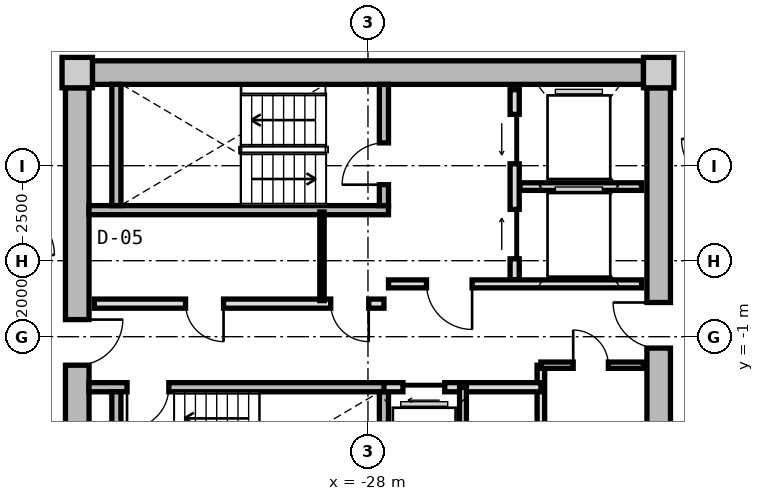
"""IFC4 building model, lengths in metres.
Left out: names, types, materials, properties, quantities, classifications, styles, units other than length and angle.
Written with IfcOpenShell. Run it as: python <this file> out.ifc"""

import sys

from ifc_helpers import new_model, si_unit, direction, frame, frame_2d, origin, origin_2d, place, context, subcontext, project, spatial, rectangle, extrude, source, transform, mapped, element, fill, save


model = new_model("IFC4")
c1 = context("Model", 3, precision=1e-05, world=origin(), true_north=direction((0.0, 1.0)))
c2 = subcontext(c1, "Body", "Model", "MODEL_VIEW")
j1 = project(units=[si_unit("LENGTHUNIT", "METRE"), si_unit("PLANEANGLEUNIT", "RADIAN")], contexts=[c1])
p1 = place(None, origin())
s1 = spatial("IfcSite", under=j1, at=p1, CompositionType="ELEMENT")
p2 = place(p1, origin())
s2 = spatial("IfcBuilding", under=s1, at=p2, CompositionType="ELEMENT")
p3 = place(p2, frame((0.0, 0.0, 140.4)))
s3 = spatial("IfcBuildingStorey", under=s2, at=p3, CompositionType="ELEMENT", Elevation=140.4)
m1 = source(origin(), c2, "Body", "SweptSolid", [
    extrude(rectangle(XDim=0.8, YDim=0.8, at=origin_2d()), origin(), (0.0, 0.0, 1.0), 3.05),
])
for number, where, z_axis, x_axis in (
    (1, (-20.35, 5.95, 0.0), (0.0, 0.0, 1.0), (1.0, 0.0, 0.0)),
    (2, (-35.65, 5.95, 0.0), (0.0, 0.0, 1.0), (1.0, 0.0, 0.0)),
):
    element("IfcColumn", number, at=place(p3, frame(where, z_axis=z_axis, x_axis=x_axis)), inside=s3, PredefinedType="COLUMN", context=c2, shape_type="MappedRepresentation", body=[
        mapped(m1, transform((0.0, 0.0, 0.0), x_axis=(1.0, 0.0, 0.0), y_axis=(0.0, 1.0, 0.0), z_axis=(0.0, 0.0, 1.0), scale=1.0)),
    ])
m2 = source(origin(), c2, "Body", "SweptSolid", [
    extrude(rectangle(XDim=14.5, YDim=0.62, at=frame_2d((7.25, 0.0))), origin(), (0.0, 0.0, 1.0), 2.81),
])
p4 = place(p3, frame((-35.25, 5.95, 0.0), z_axis=(0.0, 0.0, 1.0), x_axis=(1.0, 0.0, 0.0)))
e3 = element("IfcWall", 3, at=p4, inside=s3, PredefinedType="SHEAR", context=c2, shape_type="MappedRepresentation", body=[
    mapped(m2, transform((0.0, 0.0, 0.0), x_axis=(1.0, 0.0, 0.0), y_axis=(0.0, 1.0, 0.0), z_axis=(0.0, 0.0, 1.0), scale=1.0)),
])
m3 = source(origin(), c2, "Body", "SweptSolid", [
    extrude(rectangle(XDim=11.1, YDim=0.62, at=frame_2d((5.55, 0.0))), origin(), (0.0, 0.0, 1.0), 2.81),
])
p5 = place(p3, frame((-35.65, -5.55, 0.0), z_axis=(0.0, 0.0, 1.0), x_axis=(0.0, 1.0, 0.0)))
e4 = element("IfcWall", 4, at=p5, inside=s3, PredefinedType="SHEAR", context=c2, shape_type="MappedRepresentation", body=[
    mapped(m3, transform((0.0, 0.0, 0.0), x_axis=(1.0, 0.0, 0.0), y_axis=(0.0, 1.0, 0.0), z_axis=(0.0, 0.0, 1.0), scale=1.0)),
])
p6 = place(p5, frame((3.8, 0.0, 0.0)))
e5 = element("IfcOpeningElement", 5, at=p6, cuts=e4, PredefinedType="OPENING", context=c2, shape_type="SweptSolid", body=[
    extrude(rectangle(XDim=1.2, YDim=2.15, at=frame_2d((0.6, 1.075))), frame((0.0, 0.32, 0.0), z_axis=(0.0, -1.0, 0.0), x_axis=(1.0, 0.0, 0.0)), (0.0, 0.0, 1.0), 0.64),
])
p7 = place(p3, frame((-20.35, 5.55, 0.0), z_axis=(0.0, 0.0, 1.0), x_axis=(0.0, -1.0, 0.0)))
e6 = element("IfcWall", 6, at=p7, inside=s3, PredefinedType="SHEAR", context=c2, shape_type="MappedRepresentation", body=[
    mapped(m3, transform((0.0, 0.0, 0.0), x_axis=(1.0, 0.0, 0.0), y_axis=(0.0, 1.0, 0.0), z_axis=(0.0, 0.0, 1.0), scale=1.0)),
])
p8 = place(p7, frame((5.65, 0.0, 0.0)))
e7 = element("IfcOpeningElement", 7, at=p8, cuts=e6, PredefinedType="OPENING", context=c2, shape_type="SweptSolid", body=[
    extrude(rectangle(XDim=1.2, YDim=2.15, at=frame_2d((0.6, 1.075))), frame((0.0, 0.32, 0.0), z_axis=(0.0, -1.0, 0.0), x_axis=(1.0, 0.0, 0.0)), (0.0, 0.0, 1.0), 0.64),
])
m4 = source(origin(), c2, "Body", "SweptSolid", [
    extrude(rectangle(XDim=7.88, YDim=0.24, at=frame_2d((3.94, 0.0))), origin(), (0.0, 0.0, 1.0), 2.81),
])
p9 = place(p3, frame((-35.34, 2.33, 0.0), z_axis=(0.0, 0.0, 1.0), x_axis=(1.0, 0.0, 0.0)))
e8 = element("IfcWall", 8, at=p9, inside=s3, PredefinedType="PARTITIONING", context=c2, shape_type="MappedRepresentation", body=[
    mapped(m4, transform((0.0, 0.0, 0.0), x_axis=(1.0, 0.0, 0.0), y_axis=(0.0, 1.0, 0.0), z_axis=(0.0, 0.0, 1.0), scale=1.0)),
])
m5 = source(origin(), c2, "Body", "SweptSolid", [
    extrude(rectangle(XDim=3.19, YDim=0.24, at=frame_2d((1.595, 0.0))), origin(), (0.0, 0.0, 1.0), 2.81),
])
p10 = place(p3, frame((-34.62, 2.45, 0.0), z_axis=(0.0, 0.0, 1.0), x_axis=(0.0, 1.0, 0.0)))
e9 = element("IfcWall", 9, at=p10, inside=s3, PredefinedType="PARTITIONING", context=c2, shape_type="MappedRepresentation", body=[
    mapped(m5, transform((0.0, 0.0, 0.0), x_axis=(1.0, 0.0, 0.0), y_axis=(0.0, 1.0, 0.0), z_axis=(0.0, 0.0, 1.0), scale=1.0)),
])
p11 = place(p3, frame((-27.58, 2.45, 0.0), z_axis=(0.0, 0.0, 1.0), x_axis=(0.0, 1.0, 0.0)))
e10 = element("IfcWall", 10, at=p11, inside=s3, PredefinedType="PARTITIONING", context=c2, shape_type="MappedRepresentation", body=[
    mapped(m5, transform((0.0, 0.0, 0.0), x_axis=(1.0, 0.0, 0.0), y_axis=(0.0, 1.0, 0.0), z_axis=(0.0, 0.0, 1.0), scale=1.0)),
])
p12 = place(p11, frame((0.55, 0.0, 0.0)))
e11 = element("IfcOpeningElement", 11, at=p12, cuts=e10, PredefinedType="OPENING", context=c2, shape_type="SweptSolid", body=[
    extrude(rectangle(XDim=1.1, YDim=2.15, at=frame_2d((0.55, 1.075))), frame((0.0, 0.13, 0.0), z_axis=(0.0, -1.0, 0.0), x_axis=(1.0, 0.0, 0.0)), (0.0, 0.0, 1.0), 0.26),
])
p13 = place(p3, frame((-35.34, -2.33, 0.0), z_axis=(0.0, 0.0, 1.0), x_axis=(1.0, 0.0, 0.0)))
e12 = element("IfcWall", 12, at=p13, inside=s3, PredefinedType="PARTITIONING", context=c2, shape_type="MappedRepresentation", body=[
    mapped(m4, transform((0.0, 0.0, 0.0), x_axis=(1.0, 0.0, 0.0), y_axis=(0.0, 1.0, 0.0), z_axis=(0.0, 0.0, 1.0), scale=1.0)),
])
p14 = place(p13, frame((1.0, 0.0, 0.0)))
e13 = element("IfcOpeningElement", 13, at=p14, cuts=e12, PredefinedType="OPENING", context=c2, shape_type="SweptSolid", body=[
    extrude(rectangle(XDim=1.1, YDim=2.15, at=frame_2d((0.55, 1.075))), frame((0.0, 0.13, 0.0), z_axis=(0.0, -1.0, 0.0), x_axis=(1.0, 0.0, 0.0)), (0.0, 0.0, 1.0), 0.26),
])
for number, where, z_axis, x_axis in (
    (14, (-34.62, -5.64, 0.0), (0.0, 0.0, 1.0), (0.0, 1.0, 0.0)),
    (15, (-27.58, -5.64, 0.0), (0.0, 0.0, 1.0), (0.0, 1.0, 0.0)),
):
    element("IfcWall", number, at=place(p3, frame(where, z_axis=z_axis, x_axis=x_axis)), inside=s3, PredefinedType="PARTITIONING", context=c2, shape_type="MappedRepresentation", body=[
        mapped(m5, transform((0.0, 0.0, 0.0), x_axis=(1.0, 0.0, 0.0), y_axis=(0.0, 1.0, 0.0), z_axis=(0.0, 0.0, 1.0), scale=1.0)),
    ])
m6 = source(origin(), c2, "Body", "SweptSolid", [
    extrude(rectangle(XDim=5.0, YDim=0.24, at=frame_2d((2.5, 0.0))), origin(), (0.0, 0.0, 1.0), 2.795),
])
p15 = place(p3, frame((-24.14, 0.5, 0.0), z_axis=(0.0, 0.0, 1.0), x_axis=(0.0, 1.0, 0.0)))
e16 = element("IfcWall", 16, at=p15, inside=s3, PredefinedType="PARTITIONING", context=c2, shape_type="MappedRepresentation", body=[
    mapped(m6, transform((0.0, 0.0, 0.0), x_axis=(1.0, 0.0, 0.0), y_axis=(0.0, 1.0, 0.0), z_axis=(0.0, 0.0, 1.0), scale=1.0)),
])
p16 = place(p15, frame((3.05, 0.0, 0.0)))
e17 = element("IfcOpeningElement", 17, at=p16, cuts=e16, PredefinedType="OPENING", context=c2, shape_type="SweptSolid", body=[
    extrude(rectangle(XDim=1.3, YDim=2.2, at=frame_2d((0.65, 1.1))), frame((0.0, 0.13, 0.0), z_axis=(0.0, -1.0, 0.0), x_axis=(1.0, 0.0, 0.0)), (0.0, 0.0, 1.0), 0.26),
])
p17 = place(p15, frame((0.55, 0.0, 0.0)))
e18 = element("IfcOpeningElement", 18, at=p17, cuts=e16, PredefinedType="OPENING", context=c2, shape_type="SweptSolid", body=[
    extrude(rectangle(XDim=1.3, YDim=2.2, at=frame_2d((0.65, 1.1))), frame((0.0, 0.13, 0.0), z_axis=(0.0, -1.0, 0.0), x_axis=(1.0, 0.0, 0.0)), (0.0, 0.0, 1.0), 0.26),
])
m7 = source(origin(), c2, "Body", "SweptSolid", [
    extrude(rectangle(XDim=3.2, YDim=0.2, at=frame_2d((1.6, 0.0))), origin(), (0.0, 0.0, 1.0), 2.795),
])
p18 = place(p3, frame((-24.0, 2.95, 0.0), z_axis=(0.0, 0.0, 1.0), x_axis=(1.0, 0.0, 0.0)))
e19 = element("IfcWall", 19, at=p18, inside=s3, PredefinedType="PARTITIONING", context=c2, shape_type="MappedRepresentation", body=[
    mapped(m7, transform((0.0, 0.0, 0.0), x_axis=(1.0, 0.0, 0.0), y_axis=(0.0, 1.0, 0.0), z_axis=(0.0, 0.0, 1.0), scale=1.0)),
])
m8 = source(origin(), c2, "Body", "SweptSolid", [
    extrude(rectangle(XDim=6.66, YDim=0.21, at=frame_2d((3.33, 0.0))), origin(), (0.0, 0.0, 1.0), 2.795),
])
p19 = place(p3, frame((-27.46, 0.39, 0.0), z_axis=(0.0, 0.0, 1.0), x_axis=(1.0, 0.0, 0.0)))
e20 = element("IfcWall", 20, at=p19, inside=s3, PredefinedType="PARTITIONING", context=c2, shape_type="MappedRepresentation", body=[
    mapped(m8, transform((0.0, 0.0, 0.0), x_axis=(1.0, 0.0, 0.0), y_axis=(0.0, 1.0, 0.0), z_axis=(0.0, 0.0, 1.0), scale=1.0)),
])
p20 = place(p19, frame((1.0, 0.0, 0.0)))
e21 = element("IfcOpeningElement", 21, at=p20, cuts=e20, PredefinedType="OPENING", context=c2, shape_type="SweptSolid", body=[
    extrude(rectangle(XDim=1.2, YDim=2.15, at=frame_2d((0.6, 1.075))), frame((0.0, 0.115, 0.0), z_axis=(0.0, -1.0, 0.0), x_axis=(1.0, 0.0, 0.0)), (0.0, 0.0, 1.0), 0.23),
])
m9 = source(origin(), c2, "Body", "SweptSolid", [
    extrude(rectangle(XDim=7.62, YDim=0.24, at=frame_2d((3.81, 0.0))), origin(), (0.0, 0.0, 1.0), 2.795),
])
p21 = place(p3, frame((-35.2, -0.13, 0.0), z_axis=(0.0, 0.0, 1.0), x_axis=(1.0, 0.0, 0.0)))
e22 = element("IfcWall", 22, at=p21, inside=s3, PredefinedType="PARTITIONING", context=c2, shape_type="MappedRepresentation", body=[
    mapped(m9, transform((0.0, 0.0, 0.0), x_axis=(1.0, 0.0, 0.0), y_axis=(0.0, 1.0, 0.0), z_axis=(0.0, 0.0, 1.0), scale=1.0)),
])
p22 = place(p21, frame((6.22, 0.0, 0.0)))
e23 = element("IfcOpeningElement", 23, at=p22, cuts=e22, PredefinedType="OPENING", context=c2, shape_type="SweptSolid", body=[
    extrude(rectangle(XDim=1.0, YDim=2.1, at=frame_2d((0.5, 1.05))), frame((0.0, 0.13, 0.0), z_axis=(0.0, -1.0, 0.0), x_axis=(1.0, 0.0, 0.0)), (0.0, 0.0, 1.0), 0.26),
])
p23 = place(p21, frame((2.4, 0.0, 0.0)))
e24 = element("IfcOpeningElement", 24, at=p23, cuts=e22, PredefinedType="OPENING", context=c2, shape_type="SweptSolid", body=[
    extrude(rectangle(XDim=1.0, YDim=2.1, at=frame_2d((0.5, 1.05))), frame((0.0, 0.13, 0.0), z_axis=(0.0, -1.0, 0.0), x_axis=(1.0, 0.0, 0.0)), (0.0, 0.0, 1.0), 0.26),
])
m10 = source(origin(), c2, "Body", "SweptSolid", [
    extrude(rectangle(XDim=2.33, YDim=0.115, at=frame_2d((1.165, 0.0))), origin(), (0.0, 0.0, 1.0), 2.795),
])
p24 = place(p3, frame((-29.21, -0.05, 0.0), z_axis=(0.0, 0.0, 1.0), x_axis=(0.0, 1.0, 0.0)))
e25 = element("IfcWall", 25, at=p24, inside=s3, PredefinedType="PARTITIONING", context=c2, shape_type="MappedRepresentation", body=[
    mapped(m10, transform((0.0, 0.0, 0.0), x_axis=(1.0, 0.0, 0.0), y_axis=(0.0, 1.0, 0.0), z_axis=(0.0, 0.0, 1.0), scale=1.0)),
])
m11 = source(origin(), c2, "Body", "SweptSolid", [
    extrude(rectangle(XDim=3.8, YDim=0.2, at=frame_2d((1.9, 0.0))), origin(), (0.0, 0.0, 1.0), 2.795),
])
p25 = place(p3, frame((-23.45, -5.55, 0.0), z_axis=(0.0, 0.0, 1.0), x_axis=(0.0, 1.0, 0.0)))
e26 = element("IfcWall", 26, at=p25, inside=s3, PredefinedType="PARTITIONING", context=c2, shape_type="MappedRepresentation", body=[
    mapped(m11, transform((0.0, 0.0, 0.0), x_axis=(1.0, 0.0, 0.0), y_axis=(0.0, 1.0, 0.0), z_axis=(0.0, 0.0, 1.0), scale=1.0)),
])
m12 = source(origin(), c2, "Body", "SweptSolid", [
    extrude(rectangle(XDim=4.13, YDim=0.24, at=frame_2d((2.065, 0.0))), origin(), (0.0, 0.0, 1.0), 2.795),
])
p26 = place(p3, frame((-27.58, -2.33, 0.0), z_axis=(0.0, 0.0, 1.0), x_axis=(1.0, 0.0, 0.0)))
e27 = element("IfcWall", 27, at=p26, inside=s3, PredefinedType="PARTITIONING", context=c2, shape_type="MappedRepresentation", body=[
    mapped(m12, transform((0.0, 0.0, 0.0), x_axis=(1.0, 0.0, 0.0), y_axis=(0.0, 1.0, 0.0), z_axis=(0.0, 0.0, 1.0), scale=1.0)),
])
p27 = place(p26, frame((0.5, 0.0, 0.0)))
e28 = element("IfcOpeningElement", 28, at=p27, cuts=e27, PredefinedType="OPENING", context=c2, shape_type="SweptSolid", body=[
    extrude(rectangle(XDim=1.1, YDim=2.2, at=frame_2d((0.55, 1.1))), frame((0.0, 0.13, 0.0), z_axis=(0.0, -1.0, 0.0), x_axis=(1.0, 0.0, 0.0)), (0.0, 0.0, 1.0), 0.26),
])
m13 = source(origin(), c2, "Body", "SweptSolid", [
    extrude(rectangle(XDim=3.22, YDim=0.18, at=frame_2d((1.61, 0.0))), origin(), (0.0, 0.0, 1.0), 2.795),
])
p28 = place(p3, frame((-25.5, -5.55, 0.0), z_axis=(0.0, 0.0, 1.0), x_axis=(0.0, 1.0, 0.0)))
e29 = element("IfcWall", 29, at=p28, inside=s3, PredefinedType="PARTITIONING", context=c2, shape_type="MappedRepresentation", body=[
    mapped(m13, transform((0.0, 0.0, 0.0), x_axis=(1.0, 0.0, 0.0), y_axis=(0.0, 1.0, 0.0), z_axis=(0.0, 0.0, 1.0), scale=1.0)),
])
m14 = source(origin(), c2, "Body", "SweptSolid", [
    extrude(rectangle(XDim=2.7, YDim=0.165, at=frame_2d((1.35, 0.0))), origin(), (0.0, 0.0, 1.0), 2.795),
])
p29 = place(p3, frame((-23.45, -1.75, 0.0), z_axis=(0.0, 0.0, 1.0), x_axis=(1.0, 0.0, 0.0)))
e30 = element("IfcWall", 30, at=p29, inside=s3, PredefinedType="PARTITIONING", context=c2, shape_type="MappedRepresentation", body=[
    mapped(m14, transform((0.0, 0.0, 0.0), x_axis=(1.0, 0.0, 0.0), y_axis=(0.0, 1.0, 0.0), z_axis=(0.0, 0.0, 1.0), scale=1.0)),
])
p30 = place(p29, frame((0.85, 0.0, 0.0)))
e31 = element("IfcOpeningElement", 31, at=p30, cuts=e30, PredefinedType="OPENING", context=c2, shape_type="SweptSolid", body=[
    extrude(rectangle(XDim=0.925, YDim=2.1, at=frame_2d((0.462, 1.05))), frame((0.0, 0.093, 0.0), z_axis=(0.0, -1.0, 0.0), x_axis=(1.0, 0.0, 0.0)), (0.0, 0.0, 1.0), 0.185),
])
m15 = source(origin(), c2, "Body", "SweptSolid", [
    extrude(rectangle(XDim=1.1, YDim=2.15, at=frame_2d((0.55, 1.075))), frame((0.0, 0.025, 0.0), z_axis=(0.0, -1.0, 0.0), x_axis=(1.0, 0.0, 0.0)), (0.0, 0.0, 1.0), 0.05),
])
p31 = place(p12, origin())
e32 = element("IfcDoor", 32, at=p31, inside=s3, OperationType="SINGLE_SWING_LEFT", PredefinedType="DOOR", context=c2, shape_type="MappedRepresentation", body=[
    mapped(m15, transform((0.0, 0.0, 0.0), x_axis=(1.0, 0.0, 0.0), y_axis=(0.0, 1.0, 0.0), z_axis=(0.0, 0.0, 1.0), scale=1.0)),
])
fill(e11, e32)
p32 = place(p14, frame((1.1, 0.0, 0.0), z_axis=(0.0, 0.0, 1.0), x_axis=(-1.0, 0.0, 0.0)))
e33 = element("IfcDoor", 33, at=p32, inside=s3, OperationType="SINGLE_SWING_RIGHT", PredefinedType="DOOR", context=c2, shape_type="MappedRepresentation", body=[
    mapped(m15, transform((0.0, 0.0, 0.0), x_axis=(1.0, 0.0, 0.0), y_axis=(0.0, 1.0, 0.0), z_axis=(0.0, 0.0, 1.0), scale=1.0)),
])
fill(e13, e33)
m16 = source(origin(), c2, "Body", "SweptSolid", [
    extrude(rectangle(XDim=1.3, YDim=2.2, at=frame_2d((0.65, 1.1))), frame((0.0, 0.025, 0.0), z_axis=(0.0, -1.0, 0.0), x_axis=(1.0, 0.0, 0.0)), (0.0, 0.0, 1.0), 0.05),
])
p33 = place(p16, origin())
e34 = element("IfcDoor", 34, at=p33, inside=s3, OperationType="SLIDING_TO_LEFT", PredefinedType="DOOR", context=c2, shape_type="MappedRepresentation", body=[
    mapped(m16, transform((0.0, 0.0, 0.0), x_axis=(1.0, 0.0, 0.0), y_axis=(0.0, 1.0, 0.0), z_axis=(0.0, 0.0, 1.0), scale=1.0)),
])
fill(e17, e34)
p34 = place(p17, origin())
e35 = element("IfcDoor", 35, at=p34, inside=s3, OperationType="SLIDING_TO_RIGHT", PredefinedType="DOOR", context=c2, shape_type="MappedRepresentation", body=[
    mapped(m16, transform((0.0, 0.0, 0.0), x_axis=(1.0, 0.0, 0.0), y_axis=(0.0, 1.0, 0.0), z_axis=(0.0, 0.0, 1.0), scale=1.0)),
])
fill(e18, e35)
m17 = source(origin(), c2, "Body", "SweptSolid", [
    extrude(rectangle(XDim=1.2, YDim=2.15, at=frame_2d((0.6, 1.075))), frame((0.0, 0.025, 0.0), z_axis=(0.0, -1.0, 0.0), x_axis=(1.0, 0.0, 0.0)), (0.0, 0.0, 1.0), 0.05),
])
p35 = place(p20, frame((1.2, 0.0, 0.0), z_axis=(0.0, 0.0, 1.0), x_axis=(-1.0, 0.0, 0.0)))
e36 = element("IfcDoor", 36, at=p35, inside=s3, OperationType="SINGLE_SWING_LEFT", PredefinedType="DOOR", context=c2, shape_type="MappedRepresentation", body=[
    mapped(m17, transform((0.0, 0.0, 0.0), x_axis=(1.0, 0.0, 0.0), y_axis=(0.0, 1.0, 0.0), z_axis=(0.0, 0.0, 1.0), scale=1.0)),
])
fill(e21, e36)
p36 = place(p6, frame((1.2, 0.0, 0.0), z_axis=(0.0, 0.0, 1.0), x_axis=(-1.0, 0.0, 0.0)))
e37 = element("IfcDoor", 37, at=p36, inside=s3, OperationType="SINGLE_SWING_LEFT", PredefinedType="DOOR", context=c2, shape_type="MappedRepresentation", body=[
    mapped(m17, transform((0.0, 0.0, 0.0), x_axis=(1.0, 0.0, 0.0), y_axis=(0.0, 1.0, 0.0), z_axis=(0.0, 0.0, 1.0), scale=1.0)),
])
fill(e5, e37)
p37 = place(p8, frame((1.2, 0.0, 0.0), z_axis=(0.0, 0.0, 1.0), x_axis=(-1.0, 0.0, 0.0)))
e38 = element("IfcDoor", 38, at=p37, inside=s3, OperationType="SINGLE_SWING_RIGHT", PredefinedType="DOOR", context=c2, shape_type="MappedRepresentation", body=[
    mapped(m17, transform((0.0, 0.0, 0.0), x_axis=(1.0, 0.0, 0.0), y_axis=(0.0, 1.0, 0.0), z_axis=(0.0, 0.0, 1.0), scale=1.0)),
])
fill(e7, e38)
m18 = source(origin(), c2, "Body", "SweptSolid", [
    extrude(rectangle(XDim=1.0, YDim=2.1, at=frame_2d((0.5, 1.05))), frame((0.0, 0.025, 0.0), z_axis=(0.0, -1.0, 0.0), x_axis=(1.0, 0.0, 0.0)), (0.0, 0.0, 1.0), 0.05),
])
p38 = place(p22, frame((1.0, 0.0, 0.0), z_axis=(0.0, 0.0, 1.0), x_axis=(-1.0, 0.0, 0.0)))
e39 = element("IfcDoor", 39, at=p38, inside=s3, OperationType="SINGLE_SWING_LEFT", PredefinedType="DOOR", context=c2, shape_type="MappedRepresentation", body=[
    mapped(m18, transform((0.0, 0.0, 0.0), x_axis=(1.0, 0.0, 0.0), y_axis=(0.0, 1.0, 0.0), z_axis=(0.0, 0.0, 1.0), scale=1.0)),
])
fill(e23, e39)
p39 = place(p23, frame((1.0, 0.0, 0.0), z_axis=(0.0, 0.0, 1.0), x_axis=(-1.0, 0.0, 0.0)))
e40 = element("IfcDoor", 40, at=p39, inside=s3, OperationType="SINGLE_SWING_LEFT", PredefinedType="DOOR", context=c2, shape_type="MappedRepresentation", body=[
    mapped(m18, transform((0.0, 0.0, 0.0), x_axis=(1.0, 0.0, 0.0), y_axis=(0.0, 1.0, 0.0), z_axis=(0.0, 0.0, 1.0), scale=1.0)),
])
fill(e24, e40)
m19 = source(origin(), c2, "Body", "SweptSolid", [
    extrude(rectangle(XDim=1.1, YDim=2.2, at=frame_2d((0.55, 1.1))), frame((0.0, 0.025, 0.0), z_axis=(0.0, -1.0, 0.0), x_axis=(1.0, 0.0, 0.0)), (0.0, 0.0, 1.0), 0.05),
])
p40 = place(p27, frame((1.1, 0.0, 0.0), z_axis=(0.0, 0.0, 1.0), x_axis=(-1.0, 0.0, 0.0)))
e41 = element("IfcDoor", 41, at=p40, inside=s3, OperationType="SLIDING_TO_LEFT", PredefinedType="DOOR", context=c2, shape_type="MappedRepresentation", body=[
    mapped(m19, transform((0.0, 0.0, 0.0), x_axis=(1.0, 0.0, 0.0), y_axis=(0.0, 1.0, 0.0), z_axis=(0.0, 0.0, 1.0), scale=1.0)),
])
fill(e28, e41)
m20 = source(origin(), c2, "Body", "SweptSolid", [
    extrude(rectangle(XDim=0.925, YDim=2.1, at=frame_2d((0.462, 1.05))), frame((0.0, 0.025, 0.0), z_axis=(0.0, -1.0, 0.0), x_axis=(1.0, 0.0, 0.0)), (0.0, 0.0, 1.0), 0.05),
])
p41 = place(p30, origin())
e42 = element("IfcDoor", 42, at=p41, inside=s3, OperationType="SINGLE_SWING_LEFT", PredefinedType="DOOR", context=c2, shape_type="MappedRepresentation", body=[
    mapped(m20, transform((0.0, 0.0, 0.0), x_axis=(1.0, 0.0, 0.0), y_axis=(0.0, 1.0, 0.0), z_axis=(0.0, 0.0, 1.0), scale=1.0)),
])
fill(e31, e42)
save(model, sys.argv[1])
